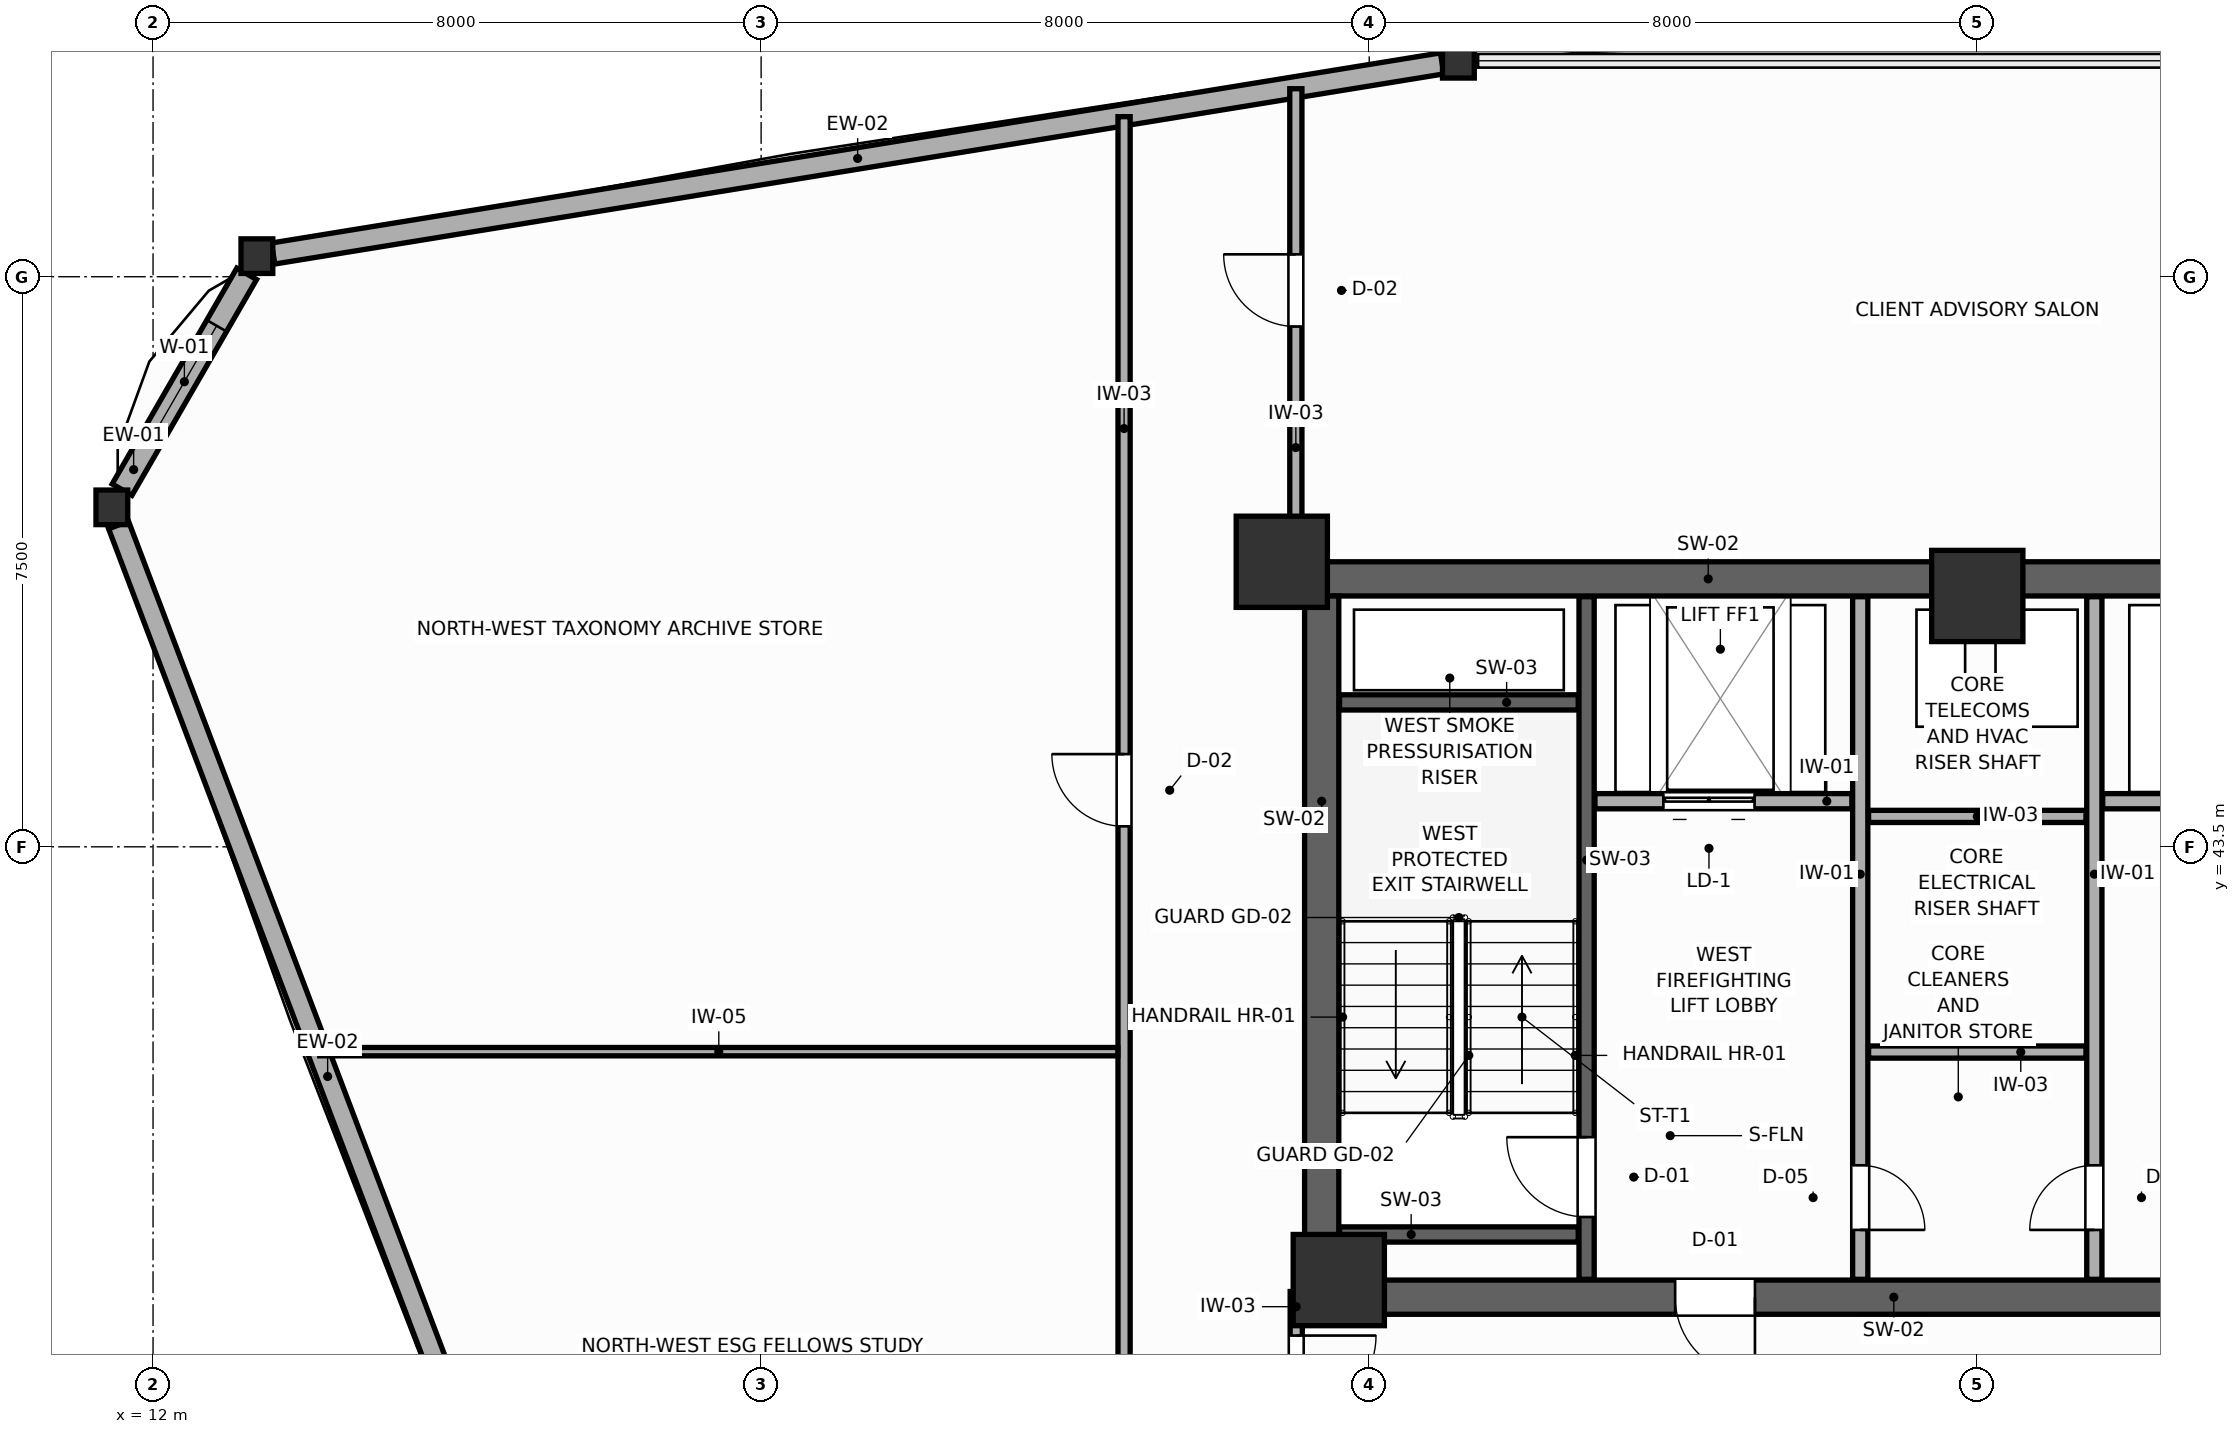
"""IFC4 building model, lengths in metres.
Left out: names, types, materials, properties, quantities, classifications, styles, units other than length and angle.
Written with IfcOpenShell. Run it as: python <this file> out.ifc"""

import sys

from ifc_helpers import new_model, si_unit, direction, frame, frame_2d, origin, origin_2d, place, context, subcontext, project, spatial, rectangle, i_section, extrude, source, transform, mapped, element, fill, save


model = new_model("IFC4")
c1 = context("Model", 3, precision=1e-05, world=origin(), true_north=direction((0.0, 1.0)))
c2 = subcontext(c1, "Body", "Model", "MODEL_VIEW")
j1 = project(units=[si_unit("LENGTHUNIT", "METRE"), si_unit("PLANEANGLEUNIT", "RADIAN")], contexts=[c1])
p1 = place(None, origin())
s1 = spatial("IfcSite", under=j1, at=p1, CompositionType="ELEMENT")
p2 = place(p1, origin())
s2 = spatial("IfcBuilding", under=s1, at=p2, CompositionType="ELEMENT")
p3 = place(p2, frame((0.0, 0.0, 120.6)))
s3 = spatial("IfcBuildingStorey", under=s2, at=p3, CompositionType="ELEMENT", Elevation=120.6)
p4 = place(p3, frame((27.15, 47.025, 0.0), z_axis=(0.0, 0.0, 1.0), x_axis=(1.0, 0.0, 0.0)))
e1 = element("IfcWall", 1, at=p4, inside=s3, PredefinedType="SHEAR", context=c2, shape_type="SweptSolid", body=[
    extrude(rectangle(XDim=17.7, YDim=0.45, at=frame_2d((8.85, 0.0))), origin(), (0.0, 0.0, 1.0), 3.6),
])
p5 = place(p3, frame((27.15, 37.575, 0.0), z_axis=(0.0, 0.0, 1.0), x_axis=(1.0, 0.0, 0.0)))
e2 = element("IfcWall", 2, at=p5, inside=s3, PredefinedType="SHEAR", context=c2, shape_type="SweptSolid", body=[
    extrude(rectangle(XDim=17.7, YDim=0.45, at=frame_2d((8.85, 0.0))), origin(), (0.0, 0.0, 1.0), 3.6),
])
p6 = place(p5, frame((4.875, 0.0, 0.0)))
e3 = element("IfcOpeningElement", 3, at=p6, cuts=e2, PredefinedType="OPENING", context=c2, shape_type="SweptSolid", body=[
    extrude(rectangle(XDim=1.05, YDim=2.1, at=frame_2d((0.525, 1.05))), frame((0.0, 0.235, 0.0), z_axis=(0.0, -1.0, 0.0), x_axis=(1.0, 0.0, 0.0)), (0.0, 0.0, 1.0), 0.47),
])
p7 = place(p5, frame((11.775, 0.0, 0.0)))
e4 = element("IfcOpeningElement", 4, at=p7, cuts=e2, PredefinedType="OPENING", context=c2, shape_type="SweptSolid", body=[
    extrude(rectangle(XDim=1.05, YDim=2.1, at=frame_2d((0.525, 1.05))), frame((0.0, 0.235, 0.0), z_axis=(0.0, -1.0, 0.0), x_axis=(1.0, 0.0, 0.0)), (0.0, 0.0, 1.0), 0.47),
])
p8 = place(p3, frame((27.375, 37.8, 0.0), z_axis=(0.0, 0.0, 1.0), x_axis=(0.0, 1.0, 0.0)))
e5 = element("IfcWall", 5, at=p8, inside=s3, PredefinedType="SHEAR", context=c2, shape_type="SweptSolid", body=[
    extrude(rectangle(XDim=9.0, YDim=0.45, at=frame_2d((4.5, 0.0))), origin(), (0.0, 0.0, 1.0), 3.6),
])
m1 = source(origin(), c2, "Body", "SweptSolid", [
    extrude(rectangle(XDim=1.2, YDim=1.2, at=origin_2d()), origin(), (0.0, 0.0, 1.0), 3.6),
])
for number, where, z_axis, x_axis in (
    (6, (26.85, 47.25, 0.0), (0.0, 0.0, 1.0), (1.0, 0.0, 0.0)),
    (7, (27.6, 37.8, 0.0), (0.0, 0.0, 1.0), (1.0, 0.0, 0.0)),
    (8, (36.0, 46.8, 0.0), (0.0, 0.0, 1.0), (1.0, 0.0, 0.0)),
):
    element("IfcColumn", number, at=place(p3, frame(where, z_axis=z_axis, x_axis=x_axis)), inside=s3, PredefinedType="COLUMN", context=c2, shape_type="MappedRepresentation", body=[
        mapped(m1, transform((0.0, 0.0, 0.0), scale=1.0)),
    ])
m2 = source(origin(), c2, "Body", "SweptSolid", [
    extrude(i_section(OverallWidth=0.418, OverallDepth=0.455, WebThickness=0.039, FlangeThickness=0.063, FilletRadius=0.015, at=origin_2d()), origin(), (0.0, 0.0, 1.0), 3.6),
])
for number, where, z_axis, x_axis in (
    (9, (29.173, 53.841, 0.0), (0.0, 0.0, 1.0), (1.0, 0.0, 0.0)),
    (10, (13.366, 51.271, 0.0), (0.0, 0.0, 1.0), (1.0, 0.0, 0.0)),
    (11, (11.458, 47.966, 0.0), (0.0, 0.0, 1.0), (1.0, 0.0, 0.0)),
):
    element("IfcColumn", number, at=place(p3, frame(where, z_axis=z_axis, x_axis=x_axis)), inside=s3, PredefinedType="COLUMN", context=c2, shape_type="MappedRepresentation", body=[
        mapped(m2, transform((0.0, 0.0, 0.0), scale=1.0)),
    ])
p9 = place(p3, frame((28.959, 53.806, 0.0), z_axis=(0.0, 0.0, 1.0), x_axis=(-0.987036263752, -0.160497395736, 0.0)))
e12 = element("IfcWall", 12, at=p9, inside=s3, PredefinedType="SOLIDWALL", context=c2, shape_type="SweptSolid", body=[
    extrude(rectangle(XDim=15.581, YDim=0.28, at=frame_2d((7.791, 0.0))), origin(), (0.0, 0.0, 1.0), 2.95),
])
p10 = place(p3, frame((13.232, 51.038, 0.0), z_axis=(0.0, 0.0, 1.0), x_axis=(-0.500014611105, -0.866016967894, 0.0)))
e13 = element("IfcWall", 13, at=p10, inside=s3, PredefinedType="SOLIDWALL", context=c2, shape_type="SweptSolid", body=[
    extrude(rectangle(XDim=3.279, YDim=0.3, at=frame_2d((1.64, 0.0))), origin(), (0.0, 0.0, 1.0), 3.0),
])
p11 = place(p10, frame((0.79, 0.0, 0.75)))
e14 = element("IfcOpeningElement", 14, at=p11, cuts=e13, PredefinedType="OPENING", context=c2, shape_type="SweptSolid", body=[
    extrude(rectangle(XDim=1.7, YDim=1.75, at=frame_2d((0.85, 0.875))), frame((0.0, 0.16, 0.0), z_axis=(0.0, -1.0, 0.0), x_axis=(1.0, 0.0, 0.0)), (0.0, 0.0, 1.0), 0.32),
])
p12 = place(p3, frame((11.546, 47.734, 0.0), z_axis=(0.0, 0.0, 1.0), x_axis=(0.354519532047, -0.935048609109, 0.0)))
e15 = element("IfcWall", 15, at=p12, inside=s3, PredefinedType="SOLIDWALL", context=c2, shape_type="SweptSolid", body=[
    extrude(rectangle(XDim=15.517, YDim=0.28, at=frame_2d((7.759, 0.0))), origin(), (0.0, 0.0, 1.0), 2.95),
])
p13 = place(p3, frame((30.86, 37.81, 0.0), z_axis=(0.0, 0.0, 1.0), x_axis=(0.0, 1.0, 0.0)))
e16 = element("IfcWall", 16, at=p13, inside=s3, PredefinedType="SHEAR", context=c2, shape_type="SweptSolid", body=[
    extrude(rectangle(XDim=8.98, YDim=0.2, at=frame_2d((4.49, 0.0))), origin(), (0.0, 0.0, 1.0), 3.6),
])
p14 = place(p13, frame((0.82, 0.0, 0.0)))
e17 = element("IfcOpeningElement", 17, at=p14, cuts=e16, PredefinedType="OPENING", context=c2, shape_type="SweptSolid", body=[
    extrude(rectangle(XDim=1.05, YDim=2.1, at=frame_2d((0.525, 1.05))), frame((0.0, 0.11, 0.0), z_axis=(0.0, -1.0, 0.0), x_axis=(1.0, 0.0, 0.0)), (0.0, 0.0, 1.0), 0.22),
])
for number, where, z_axis, x_axis in (
    (18, (27.61, 45.4, 0.0), (0.0, 0.0, 1.0), (1.0, 0.0, 0.0)),
    (19, (27.61, 38.4, 0.0), (0.0, 0.0, 1.0), (1.0, 0.0, 0.0)),
):
    element("IfcWall", number, at=place(p3, frame(where, z_axis=z_axis, x_axis=x_axis)), inside=s3, PredefinedType="SHEAR", context=c2, shape_type="SweptSolid", body=[
        extrude(rectangle(XDim=3.14, YDim=0.2, at=frame_2d((1.57, 0.0))), origin(), (0.0, 0.0, 1.0), 3.6),
    ])
p15 = place(p3, frame((30.97, 44.1, 0.0), z_axis=(0.0, 0.0, 1.0), x_axis=(1.0, 0.0, 0.0)))
e20 = element("IfcWall", 20, at=p15, inside=s3, PredefinedType="PARTITIONING", context=c2, shape_type="SweptSolid", body=[
    extrude(rectangle(XDim=3.38, YDim=0.2, at=frame_2d((1.69, 0.0))), origin(), (0.0, 0.0, 1.0), 3.4),
])
p16 = place(p15, frame((0.9, 0.0, 0.0)))
e21 = element("IfcOpeningElement", 21, at=p16, cuts=e20, PredefinedType="OPENING", context=c2, shape_type="SweptSolid", body=[
    extrude(rectangle(XDim=1.2, YDim=2.1, at=frame_2d((0.6, 1.05))), frame((0.0, 0.11, 0.0), z_axis=(0.0, -1.0, 0.0), x_axis=(1.0, 0.0, 0.0)), (0.0, 0.0, 1.0), 0.22),
])
p17 = place(p3, frame((37.65, 44.1, 0.0), z_axis=(0.0, 0.0, 1.0), x_axis=(1.0, 0.0, 0.0)))
e22 = element("IfcWall", 22, at=p17, inside=s3, PredefinedType="PARTITIONING", context=c2, shape_type="SweptSolid", body=[
    extrude(rectangle(XDim=3.38, YDim=0.2, at=frame_2d((1.69, 0.0))), origin(), (0.0, 0.0, 1.0), 3.4),
])
p18 = place(p17, frame((1.0, 0.0, 0.0)))
e23 = element("IfcOpeningElement", 23, at=p18, cuts=e22, PredefinedType="OPENING", context=c2, shape_type="SweptSolid", body=[
    extrude(rectangle(XDim=1.2, YDim=2.1, at=frame_2d((0.6, 1.05))), frame((0.0, 0.11, 0.0), z_axis=(0.0, -1.0, 0.0), x_axis=(1.0, 0.0, 0.0)), (0.0, 0.0, 1.0), 0.22),
])
p19 = place(p3, frame((34.46, 37.81, 0.0), z_axis=(0.0, 0.0, 1.0), x_axis=(0.0, 1.0, 0.0)))
e24 = element("IfcWall", 24, at=p19, inside=s3, PredefinedType="PARTITIONING", context=c2, shape_type="SweptSolid", body=[
    extrude(rectangle(XDim=8.98, YDim=0.2, at=frame_2d((4.49, 0.0))), origin(), (0.0, 0.0, 1.0), 3.4),
])
p20 = place(p19, frame((0.65, 0.0, 0.0)))
e25 = element("IfcOpeningElement", 25, at=p20, cuts=e24, PredefinedType="OPENING", context=c2, shape_type="SweptSolid", body=[
    extrude(rectangle(XDim=0.85, YDim=2.05, at=frame_2d((0.425, 1.025))), frame((0.0, 0.11, 0.0), z_axis=(0.0, -1.0, 0.0), x_axis=(1.0, 0.0, 0.0)), (0.0, 0.0, 1.0), 0.22),
])
p21 = place(p3, frame((37.54, 37.81, 0.0), z_axis=(0.0, 0.0, 1.0), x_axis=(0.0, 1.0, 0.0)))
e26 = element("IfcWall", 26, at=p21, inside=s3, PredefinedType="PARTITIONING", context=c2, shape_type="SweptSolid", body=[
    extrude(rectangle(XDim=8.98, YDim=0.2, at=frame_2d((4.49, 0.0))), origin(), (0.0, 0.0, 1.0), 3.4),
])
p22 = place(p21, frame((0.65, 0.0, 0.0)))
e27 = element("IfcOpeningElement", 27, at=p22, cuts=e26, PredefinedType="OPENING", context=c2, shape_type="SweptSolid", body=[
    extrude(rectangle(XDim=0.85, YDim=2.05, at=frame_2d((0.425, 1.025))), frame((0.0, 0.11, 0.0), z_axis=(0.0, -1.0, 0.0), x_axis=(1.0, 0.0, 0.0)), (0.0, 0.0, 1.0), 0.22),
])
for number, where, z_axis, x_axis in (
    (28, (34.57, 40.8, 0.0), (0.0, 0.0, 1.0), (1.0, 0.0, 0.0)),
    (29, (34.57, 43.9, 0.0), (0.0, 0.0, 1.0), (1.0, 0.0, 0.0)),
):
    element("IfcWall", number, at=place(p3, frame(where, z_axis=z_axis, x_axis=x_axis)), inside=s3, PredefinedType="PARTITIONING", context=c2, shape_type="SweptSolid", body=[
        extrude(rectangle(XDim=2.86, YDim=0.16, at=frame_2d((1.43, 0.0))), origin(), (0.0, 0.0, 1.0), 3.4),
    ])
p23 = place(p3, frame((27.04, 35.54, 0.0), z_axis=(0.0, 0.0, 1.0), x_axis=(0.0, 1.0, 0.0)))
e30 = element("IfcWall", 30, at=p23, inside=s3, PredefinedType="PARTITIONING", context=c2, shape_type="SweptSolid", body=[
    extrude(rectangle(XDim=2.11, YDim=0.16, at=frame_2d((1.055, 0.0))), origin(), (0.0, 0.0, 1.0), 3.4),
])
p24 = place(p23, frame((0.48, 0.0, 0.0)))
e31 = element("IfcOpeningElement", 31, at=p24, cuts=e30, PredefinedType="OPENING", context=c2, shape_type="SweptSolid", body=[
    extrude(rectangle(XDim=1.05, YDim=2.1, at=frame_2d((0.525, 1.05))), frame((0.0, 0.09, 0.0), z_axis=(0.0, -1.0, 0.0), x_axis=(1.0, 0.0, 0.0)), (0.0, 0.0, 1.0), 0.18),
])
p25 = place(p3, frame((24.775, 32.31, 0.0), z_axis=(0.0, 0.0, 1.0), x_axis=(0.0, 1.0, 0.0)))
e32 = element("IfcWall", 32, at=p25, inside=s3, PredefinedType="PARTITIONING", context=c2, shape_type="SweptSolid", body=[
    extrude(rectangle(XDim=20.796, YDim=0.16, at=frame_2d((10.398, 0.0))), origin(), (0.0, 0.0, 1.0), 3.4),
])
p26 = place(p25, frame((3.082, 0.0, 0.0)))
e33 = element("IfcOpeningElement", 33, at=p26, cuts=e32, PredefinedType="OPENING", context=c2, shape_type="SweptSolid", body=[
    extrude(rectangle(XDim=0.95, YDim=2.05, at=frame_2d((0.475, 1.025))), frame((0.0, 0.09, 0.0), z_axis=(0.0, -1.0, 0.0), x_axis=(1.0, 0.0, 0.0)), (0.0, 0.0, 1.0), 0.18),
])
p27 = place(p25, frame((11.46, 0.0, 0.0)))
e34 = element("IfcOpeningElement", 34, at=p27, cuts=e32, PredefinedType="OPENING", context=c2, shape_type="SweptSolid", body=[
    extrude(rectangle(XDim=0.95, YDim=2.05, at=frame_2d((0.475, 1.025))), frame((0.0, 0.09, 0.0), z_axis=(0.0, -1.0, 0.0), x_axis=(1.0, 0.0, 0.0)), (0.0, 0.0, 1.0), 0.18),
])
p28 = place(p3, frame((27.035, 47.34, 0.0), z_axis=(0.0, 0.0, 1.0), x_axis=(0.0, 1.0, 0.0)))
e35 = element("IfcWall", 35, at=p28, inside=s3, PredefinedType="PARTITIONING", context=c2, shape_type="SweptSolid", body=[
    extrude(rectangle(XDim=6.133, YDim=0.16, at=frame_2d((3.067, 0.0))), origin(), (0.0, 0.0, 1.0), 3.4),
])
p29 = place(p28, frame((3.005, 0.0, 0.0)))
e36 = element("IfcOpeningElement", 36, at=p29, cuts=e35, PredefinedType="OPENING", context=c2, shape_type="SweptSolid", body=[
    extrude(rectangle(XDim=0.95, YDim=2.05, at=frame_2d((0.475, 1.025))), frame((0.0, 0.09, 0.0), z_axis=(0.0, -1.0, 0.0), x_axis=(1.0, 0.0, 0.0)), (0.0, 0.0, 1.0), 0.18),
])
p30 = place(p3, frame((14.193, 40.805, 0.0), z_axis=(0.0, 0.0, 1.0), x_axis=(1.0, 0.0, 0.0)))
e37 = element("IfcWall", 37, at=p30, inside=s3, PredefinedType="MOVABLE", context=c2, shape_type="SweptSolid", body=[
    extrude(rectangle(XDim=10.5, YDim=0.11, at=frame_2d((5.25, 0.0))), origin(), (0.0, 0.0, 1.0), 3.4),
])
p31 = place(p11, origin())
e38 = element("IfcWindow", 38, at=p31, inside=s3, PartitioningType="SINGLE_PANEL", PredefinedType="WINDOW", context=c2, shape_type="SweptSolid", body=[
    extrude(rectangle(XDim=1.7, YDim=1.75, at=frame_2d((0.85, 0.875))), frame((0.0, 0.03, 0.0), z_axis=(0.0, -1.0, 0.0), x_axis=(1.0, 0.0, 0.0)), (0.0, 0.0, 1.0), 0.06),
])
fill(e14, e38)
p32 = place(p14, origin())
e39 = element("IfcDoor", 39, at=p32, inside=s3, OperationType="SINGLE_SWING_RIGHT", PredefinedType="DOOR", context=c2, shape_type="SweptSolid", body=[
    extrude(rectangle(XDim=1.05, YDim=2.1, at=frame_2d((0.525, 1.05))), frame((0.0, 0.025, 0.0), z_axis=(0.0, -1.0, 0.0), x_axis=(1.0, 0.0, 0.0)), (0.0, 0.0, 1.0), 0.05),
])
fill(e17, e39)
p33 = place(p16, origin())
e40 = element("IfcDoor", 40, at=p33, inside=s3, OperationType="DOUBLE_DOOR_SLIDING", PredefinedType="DOOR", context=c2, shape_type="SweptSolid", body=[
    extrude(rectangle(XDim=1.2, YDim=2.1, at=frame_2d((0.6, 1.05))), frame((0.0, 0.025, 0.0), z_axis=(0.0, -1.0, 0.0), x_axis=(1.0, 0.0, 0.0)), (0.0, 0.0, 1.0), 0.05),
])
fill(e21, e40)
p34 = place(p20, frame((0.85, 0.0, 0.0), z_axis=(0.0, 0.0, 1.0), x_axis=(-1.0, 0.0, 0.0)))
e41 = element("IfcDoor", 41, at=p34, inside=s3, OperationType="SINGLE_SWING_RIGHT", PredefinedType="DOOR", context=c2, shape_type="SweptSolid", body=[
    extrude(rectangle(XDim=0.85, YDim=2.05, at=frame_2d((0.425, 1.025))), frame((0.0, 0.025, 0.0), z_axis=(0.0, -1.0, 0.0), x_axis=(1.0, 0.0, 0.0)), (0.0, 0.0, 1.0), 0.05),
])
fill(e25, e41)
p35 = place(p22, origin())
e42 = element("IfcDoor", 42, at=p35, inside=s3, OperationType="SINGLE_SWING_LEFT", PredefinedType="DOOR", context=c2, shape_type="SweptSolid", body=[
    extrude(rectangle(XDim=0.85, YDim=2.05, at=frame_2d((0.425, 1.025))), frame((0.0, 0.025, 0.0), z_axis=(0.0, -1.0, 0.0), x_axis=(1.0, 0.0, 0.0)), (0.0, 0.0, 1.0), 0.05),
])
fill(e27, e42)
p36 = place(p24, frame((1.05, 0.0, 0.0), z_axis=(0.0, 0.0, 1.0), x_axis=(-1.0, 0.0, 0.0)))
e43 = element("IfcDoor", 43, at=p36, inside=s3, OperationType="SINGLE_SWING_LEFT", PredefinedType="DOOR", context=c2, shape_type="SweptSolid", body=[
    extrude(rectangle(XDim=1.05, YDim=2.1, at=frame_2d((0.525, 1.05))), frame((0.0, 0.025, 0.0), z_axis=(0.0, -1.0, 0.0), x_axis=(1.0, 0.0, 0.0)), (0.0, 0.0, 1.0), 0.05),
])
fill(e31, e43)
p37 = place(p27, origin())
e44 = element("IfcDoor", 44, at=p37, inside=s3, OperationType="SINGLE_SWING_RIGHT", PredefinedType="DOOR", context=c2, shape_type="SweptSolid", body=[
    extrude(rectangle(XDim=0.95, YDim=2.05, at=frame_2d((0.475, 1.025))), frame((0.0, 0.025, 0.0), z_axis=(0.0, -1.0, 0.0), x_axis=(1.0, 0.0, 0.0)), (0.0, 0.0, 1.0), 0.05),
])
fill(e34, e44)
p38 = place(p29, origin())
e45 = element("IfcDoor", 45, at=p38, inside=s3, OperationType="SINGLE_SWING_RIGHT", PredefinedType="DOOR", context=c2, shape_type="SweptSolid", body=[
    extrude(rectangle(XDim=0.95, YDim=2.05, at=frame_2d((0.475, 1.025))), frame((0.0, 0.025, 0.0), z_axis=(0.0, -1.0, 0.0), x_axis=(1.0, 0.0, 0.0)), (0.0, 0.0, 1.0), 0.05),
])
fill(e36, e45)
p39 = place(p6, frame((1.05, 0.0, 0.0), z_axis=(0.0, 0.0, 1.0), x_axis=(-1.0, 0.0, 0.0)))
e46 = element("IfcDoor", 46, at=p39, inside=s3, OperationType="SINGLE_SWING_LEFT", PredefinedType="DOOR", context=c2, shape_type="SweptSolid", body=[
    extrude(rectangle(XDim=1.05, YDim=2.1, at=frame_2d((0.525, 1.05))), frame((0.0, 0.025, 0.0), z_axis=(0.0, -1.0, 0.0), x_axis=(1.0, 0.0, 0.0)), (0.0, 0.0, 1.0), 0.05),
])
fill(e3, e46)
save(model, sys.argv[1])
